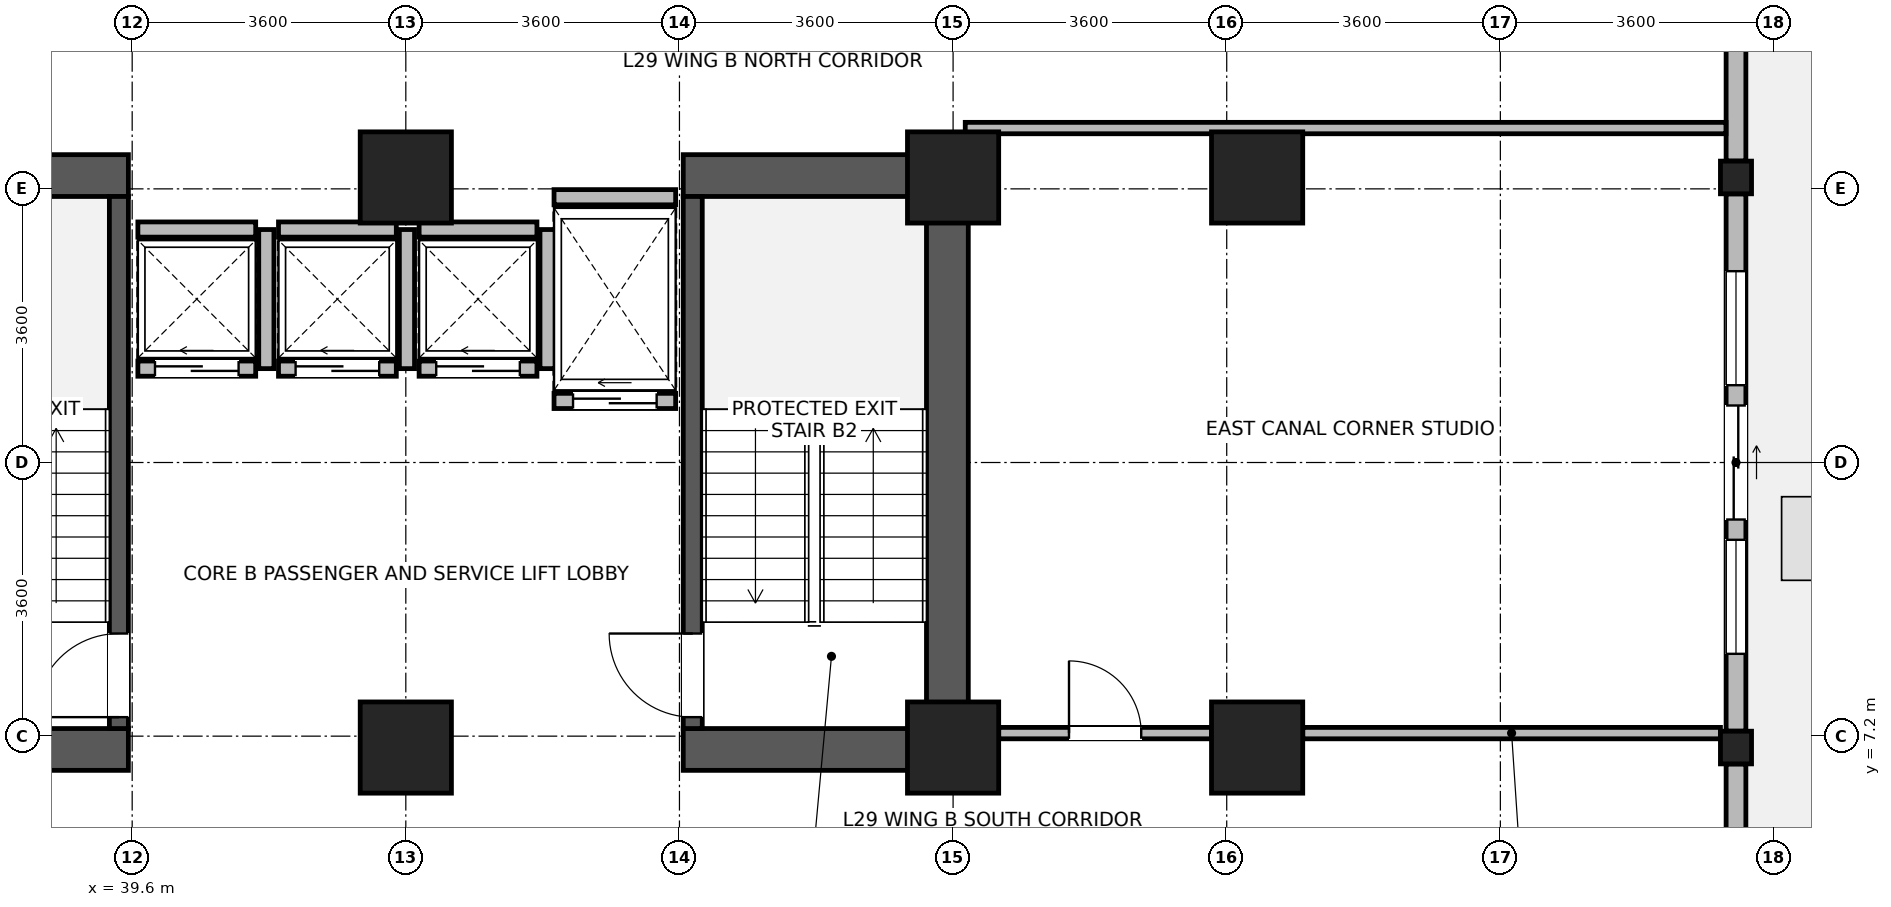
"""IFC4 building model, lengths in metres.
Left out: names, types, materials, properties, quantities, classifications, styles, units other than length and angle.
Written with IfcOpenShell. Run it as: python <this file> out.ifc"""

import sys

from ifc_helpers import new_model, si_unit, direction, frame, frame_2d, origin, origin_2d, place, context, subcontext, project, spatial, rectangle, i_section, extrude, source, transform, mapped, element, fill, save


model = new_model("IFC4")
c1 = context("Model", 3, precision=1e-05, world=origin(), true_north=direction((0.0, 1.0)))
c2 = subcontext(c1, "Body", "Model", "MODEL_VIEW")
j1 = project(units=[si_unit("LENGTHUNIT", "METRE"), si_unit("PLANEANGLEUNIT", "RADIAN")], contexts=[c1])
p1 = place(None, origin())
s1 = spatial("IfcSite", under=j1, at=p1, CompositionType="ELEMENT")
p2 = place(p1, origin())
s2 = spatial("IfcBuilding", under=s1, at=p2, CompositionType="ELEMENT")
p3 = place(p2, frame((0.0, 0.0, 115.6)))
s3 = spatial("IfcBuildingStorey", under=s2, at=p3, CompositionType="ELEMENT", Elevation=115.6)
p4 = place(p3, frame((50.325, 6.75, 0.0), z_axis=(0.0, 0.0, 1.0), x_axis=(0.0, 1.0, 0.0)))
e1 = element("IfcWall", 1, at=p4, inside=s3, PredefinedType="SHEAR", context=c2, shape_type="SweptSolid", body=[
    extrude(rectangle(XDim=8.1, YDim=0.55, at=frame_2d((4.05, 0.0))), origin(), (0.0, 0.0, 1.0), 3.45),
])
for number, where, z_axis, x_axis in (
    (2, (36.35, 7.025, 0.0), (0.0, 0.0, 1.0), (1.0, 0.0, 0.0)),
    (3, (46.85, 7.025, 0.0), (0.0, 0.0, 1.0), (1.0, 0.0, 0.0)),
    (4, (36.35, 14.575, 0.0), (0.0, 0.0, 1.0), (1.0, 0.0, 0.0)),
    (5, (46.85, 14.575, 0.0), (0.0, 0.0, 1.0), (1.0, 0.0, 0.0)),
):
    element("IfcWall", number, at=place(p3, frame(where, z_axis=z_axis, x_axis=x_axis)), inside=s3, PredefinedType="SHEAR", context=c2, shape_type="SweptSolid", body=[
        extrude(rectangle(XDim=3.2, YDim=0.55, at=frame_2d((1.6, 0.0))), origin(), (0.0, 0.0, 1.0), 3.45),
    ])
p5 = place(p3, frame((39.425, 7.3, 0.0), z_axis=(0.0, 0.0, 1.0), x_axis=(0.0, 1.0, 0.0)))
e6 = element("IfcWall", 6, at=p5, inside=s3, PredefinedType="SHEAR", context=c2, shape_type="SweptSolid", body=[
    extrude(rectangle(XDim=7.0, YDim=0.25, at=frame_2d((3.5, 0.0))), origin(), (0.0, 0.0, 1.0), 3.45),
])
p6 = place(p5, frame((0.15, 0.0, 0.0)))
e7 = element("IfcOpeningElement", 7, at=p6, cuts=e6, PredefinedType="OPENING", context=c2, shape_type="SweptSolid", body=[
    extrude(rectangle(XDim=1.1, YDim=2.08, at=frame_2d((0.55, 1.04))), frame((0.0, 0.135, 0.0), z_axis=(0.0, -1.0, 0.0), x_axis=(1.0, 0.0, 0.0)), (0.0, 0.0, 1.0), 0.27),
])
p7 = place(p3, frame((46.975, 7.3, 0.0), z_axis=(0.0, 0.0, 1.0), x_axis=(0.0, 1.0, 0.0)))
e8 = element("IfcWall", 8, at=p7, inside=s3, PredefinedType="SHEAR", context=c2, shape_type="SweptSolid", body=[
    extrude(rectangle(XDim=7.0, YDim=0.25, at=frame_2d((3.5, 0.0))), origin(), (0.0, 0.0, 1.0), 3.45),
])
p8 = place(p7, frame((0.15, 0.0, 0.0)))
e9 = element("IfcOpeningElement", 9, at=p8, cuts=e8, PredefinedType="OPENING", context=c2, shape_type="SweptSolid", body=[
    extrude(rectangle(XDim=1.1, YDim=2.08, at=frame_2d((0.55, 1.04))), frame((0.0, 0.135, 0.0), z_axis=(0.0, -1.0, 0.0), x_axis=(1.0, 0.0, 0.0)), (0.0, 0.0, 1.0), 0.27),
])
m1 = source(origin(), c2, "Body", "SweptSolid", [
    extrude(rectangle(XDim=1.2, YDim=1.2, at=origin_2d()), origin(), (0.0, 0.0, 1.0), 3.7),
])
for number, where, z_axis, x_axis in (
    (10, (43.2, 7.05, 0.0), (0.0, 0.0, 1.0), (1.0, 0.0, 0.0)),
    (11, (43.2, 14.55, 0.0), (0.0, 0.0, 1.0), (1.0, 0.0, 0.0)),
    (12, (50.4, 7.05, 0.0), (0.0, 0.0, 1.0), (1.0, 0.0, 0.0)),
    (13, (50.4, 14.55, 0.0), (0.0, 0.0, 1.0), (1.0, 0.0, 0.0)),
    (14, (54.4, 7.05, 0.0), (0.0, 0.0, 1.0), (1.0, 0.0, 0.0)),
    (15, (54.4, 14.55, 0.0), (0.0, 0.0, 1.0), (1.0, 0.0, 0.0)),
):
    element("IfcColumn", number, at=place(p3, frame(where, z_axis=z_axis, x_axis=x_axis)), inside=s3, PredefinedType="COLUMN", context=c2, shape_type="MappedRepresentation", body=[
        mapped(m1, transform((0.0, 0.0, 0.0), x_axis=(1.0, 0.0, 0.0), y_axis=(0.0, 1.0, 0.0), z_axis=(0.0, 0.0, 1.0), scale=1.0)),
    ])
m2 = source(origin(), c2, "Body", "SweptSolid", [
    extrude(i_section(OverallWidth=0.409, OverallDepth=0.43, WebThickness=0.024, FlangeThickness=0.033, FilletRadius=0.015, at=origin_2d()), origin(), (0.0, 0.0, 1.0), 3.7),
])
for number, where, z_axis, x_axis in (
    (16, (60.7, 7.05, 0.0), (0.0, 0.0, 1.0), (1.0, 0.0, 0.0)),
    (17, (60.7, 14.55, 0.0), (0.0, 0.0, 1.0), (1.0, 0.0, 0.0)),
):
    element("IfcColumn", number, at=place(p3, frame(where, z_axis=z_axis, x_axis=x_axis)), inside=s3, PredefinedType="COLUMN", context=c2, shape_type="MappedRepresentation", body=[
        mapped(m2, transform((0.0, 0.0, 0.0), x_axis=(1.0, 0.0, 0.0), y_axis=(0.0, 1.0, 0.0), z_axis=(0.0, 0.0, 1.0), scale=1.0)),
    ])
p9 = place(p3, frame((60.7, 6.834, 0.0), z_axis=(0.0, 0.0, 1.0), x_axis=(0.0, -1.0, 0.0)))
e18 = element("IfcWall", 18, at=p9, inside=s3, PredefinedType="STANDARD", context=c2, shape_type="SweptSolid", body=[
    extrude(rectangle(XDim=2.164, YDim=0.26, at=frame_2d((1.082, 0.0))), origin(), (0.0, 0.0, 1.0), 3.43),
])
p10 = place(p3, frame((60.7, 14.334, 0.0), z_axis=(0.0, 0.0, 1.0), x_axis=(0.0, -1.0, 0.0)))
e19 = element("IfcWall", 19, at=p10, inside=s3, PredefinedType="STANDARD", context=c2, shape_type="SweptSolid", body=[
    extrude(rectangle(XDim=7.068, YDim=0.26, at=frame_2d((3.534, 0.0))), origin(), (0.0, 0.0, 1.0), 2.98),
])
p11 = place(p10, frame((2.784, 0.0, 0.0)))
e20 = element("IfcOpeningElement", 20, at=p11, cuts=e19, PredefinedType="OPENING", context=c2, shape_type="SweptSolid", body=[
    extrude(rectangle(XDim=1.5, YDim=2.15, at=frame_2d((0.75, 1.075))), frame((0.0, 0.14, 0.0), z_axis=(0.0, -1.0, 0.0), x_axis=(1.0, 0.0, 0.0)), (0.0, 0.0, 1.0), 0.28),
])
p12 = place(p10, frame((1.017, 0.0, 0.85)))
e21 = element("IfcOpeningElement", 21, at=p12, cuts=e19, PredefinedType="OPENING", context=c2, shape_type="SweptSolid", body=[
    extrude(rectangle(XDim=1.5, YDim=1.85, at=frame_2d((0.75, 0.925))), frame((0.0, 0.14, 0.0), z_axis=(0.0, -1.0, 0.0), x_axis=(1.0, 0.0, 0.0)), (0.0, 0.0, 1.0), 0.28),
])
p13 = place(p10, frame((4.551, 0.0, 0.85)))
e22 = element("IfcOpeningElement", 22, at=p13, cuts=e19, PredefinedType="OPENING", context=c2, shape_type="SweptSolid", body=[
    extrude(rectangle(XDim=1.5, YDim=1.85, at=frame_2d((0.75, 0.925))), frame((0.0, 0.14, 0.0), z_axis=(0.0, -1.0, 0.0), x_axis=(1.0, 0.0, 0.0)), (0.0, 0.0, 1.0), 0.28),
])
p14 = place(p3, frame((60.7, 21.384, 0.0), z_axis=(0.0, 0.0, 1.0), x_axis=(0.0, -1.0, 0.0)))
e23 = element("IfcWall", 23, at=p14, inside=s3, PredefinedType="STANDARD", context=c2, shape_type="SweptSolid", body=[
    extrude(rectangle(XDim=6.618, YDim=0.26, at=frame_2d((3.309, 0.0))), origin(), (0.0, 0.0, 1.0), 2.98),
])
p15 = place(p14, frame((0.905, 0.0, 0.85)))
e24 = element("IfcOpeningElement", 24, at=p15, cuts=e23, PredefinedType="OPENING", context=c2, shape_type="SweptSolid", body=[
    extrude(rectangle(XDim=1.5, YDim=1.85, at=frame_2d((0.75, 0.925))), frame((0.0, 0.14, 0.0), z_axis=(0.0, -1.0, 0.0), x_axis=(1.0, 0.0, 0.0)), (0.0, 0.0, 1.0), 0.28),
])
p16 = place(p14, frame((2.834, 0.0, 0.85)))
e25 = element("IfcOpeningElement", 25, at=p16, cuts=e23, PredefinedType="OPENING", context=c2, shape_type="SweptSolid", body=[
    extrude(rectangle(XDim=0.95, YDim=1.75, at=frame_2d((0.475, 0.875))), frame((0.0, 0.14, 0.0), z_axis=(0.0, -1.0, 0.0), x_axis=(1.0, 0.0, 0.0)), (0.0, 0.0, 1.0), 0.28),
])
p17 = place(p3, frame((39.675, 12.035, 0.0), z_axis=(0.0, 0.0, 1.0), x_axis=(1.0, 0.0, 0.0)))
e26 = element("IfcWall", 26, at=p17, inside=s3, PredefinedType="PARTITIONING", context=c2, shape_type="SweptSolid", body=[
    extrude(rectangle(XDim=1.55, YDim=0.2, at=frame_2d((0.775, 0.0))), origin(), (0.0, 0.0, 1.0), 3.43),
])
p18 = place(p17, frame((0.225, 0.0, 0.0)))
e27 = element("IfcOpeningElement", 27, at=p18, cuts=e26, PredefinedType="OPENING", context=c2, shape_type="SweptSolid", body=[
    extrude(rectangle(XDim=1.1, YDim=2.12, at=frame_2d((0.55, 1.06))), frame((0.0, 0.11, 0.0), z_axis=(0.0, -1.0, 0.0), x_axis=(1.0, 0.0, 0.0)), (0.0, 0.0, 1.0), 0.22),
])
p19 = place(p3, frame((39.675, 13.865, 0.0), z_axis=(0.0, 0.0, 1.0), x_axis=(1.0, 0.0, 0.0)))
e28 = element("IfcWall", 28, at=p19, inside=s3, PredefinedType="PARTITIONING", context=c2, shape_type="SweptSolid", body=[
    extrude(rectangle(XDim=1.55, YDim=0.2, at=frame_2d((0.775, 0.0))), origin(), (0.0, 0.0, 1.0), 3.43),
])
p20 = place(p3, frame((41.365, 12.035, 0.0), z_axis=(0.0, 0.0, 1.0), x_axis=(0.0, 1.0, 0.0)))
e29 = element("IfcWall", 29, at=p20, inside=s3, PredefinedType="PARTITIONING", context=c2, shape_type="SweptSolid", body=[
    extrude(rectangle(XDim=1.83, YDim=0.2, at=frame_2d((0.915, 0.0))), origin(), (0.0, 0.0, 1.0), 3.43),
])
p21 = place(p3, frame((41.525, 12.035, 0.0), z_axis=(0.0, 0.0, 1.0), x_axis=(1.0, 0.0, 0.0)))
e30 = element("IfcWall", 30, at=p21, inside=s3, PredefinedType="PARTITIONING", context=c2, shape_type="SweptSolid", body=[
    extrude(rectangle(XDim=1.55, YDim=0.2, at=frame_2d((0.775, 0.0))), origin(), (0.0, 0.0, 1.0), 3.43),
])
p22 = place(p21, frame((0.225, 0.0, 0.0)))
e31 = element("IfcOpeningElement", 31, at=p22, cuts=e30, PredefinedType="OPENING", context=c2, shape_type="SweptSolid", body=[
    extrude(rectangle(XDim=1.1, YDim=2.12, at=frame_2d((0.55, 1.06))), frame((0.0, 0.11, 0.0), z_axis=(0.0, -1.0, 0.0), x_axis=(1.0, 0.0, 0.0)), (0.0, 0.0, 1.0), 0.22),
])
p23 = place(p3, frame((41.525, 13.865, 0.0), z_axis=(0.0, 0.0, 1.0), x_axis=(1.0, 0.0, 0.0)))
e32 = element("IfcWall", 32, at=p23, inside=s3, PredefinedType="PARTITIONING", context=c2, shape_type="SweptSolid", body=[
    extrude(rectangle(XDim=1.55, YDim=0.2, at=frame_2d((0.775, 0.0))), origin(), (0.0, 0.0, 1.0), 3.43),
])
p24 = place(p3, frame((43.215, 12.035, 0.0), z_axis=(0.0, 0.0, 1.0), x_axis=(0.0, 1.0, 0.0)))
e33 = element("IfcWall", 33, at=p24, inside=s3, PredefinedType="PARTITIONING", context=c2, shape_type="SweptSolid", body=[
    extrude(rectangle(XDim=1.83, YDim=0.2, at=frame_2d((0.915, 0.0))), origin(), (0.0, 0.0, 1.0), 3.43),
])
p25 = place(p3, frame((43.375, 12.035, 0.0), z_axis=(0.0, 0.0, 1.0), x_axis=(1.0, 0.0, 0.0)))
e34 = element("IfcWall", 34, at=p25, inside=s3, PredefinedType="PARTITIONING", context=c2, shape_type="SweptSolid", body=[
    extrude(rectangle(XDim=1.55, YDim=0.2, at=frame_2d((0.775, 0.0))), origin(), (0.0, 0.0, 1.0), 3.43),
])
p26 = place(p25, frame((0.225, 0.0, 0.0)))
e35 = element("IfcOpeningElement", 35, at=p26, cuts=e34, PredefinedType="OPENING", context=c2, shape_type="SweptSolid", body=[
    extrude(rectangle(XDim=1.1, YDim=2.12, at=frame_2d((0.55, 1.06))), frame((0.0, 0.11, 0.0), z_axis=(0.0, -1.0, 0.0), x_axis=(1.0, 0.0, 0.0)), (0.0, 0.0, 1.0), 0.22),
])
p27 = place(p3, frame((43.375, 13.865, 0.0), z_axis=(0.0, 0.0, 1.0), x_axis=(1.0, 0.0, 0.0)))
e36 = element("IfcWall", 36, at=p27, inside=s3, PredefinedType="PARTITIONING", context=c2, shape_type="SweptSolid", body=[
    extrude(rectangle(XDim=1.55, YDim=0.2, at=frame_2d((0.775, 0.0))), origin(), (0.0, 0.0, 1.0), 3.43),
])
p28 = place(p3, frame((45.065, 12.035, 0.0), z_axis=(0.0, 0.0, 1.0), x_axis=(0.0, 1.0, 0.0)))
e37 = element("IfcWall", 37, at=p28, inside=s3, PredefinedType="PARTITIONING", context=c2, shape_type="SweptSolid", body=[
    extrude(rectangle(XDim=1.83, YDim=0.2, at=frame_2d((0.915, 0.0))), origin(), (0.0, 0.0, 1.0), 3.43),
])
p29 = place(p3, frame((45.15, 11.61, 0.0), z_axis=(0.0, 0.0, 1.0), x_axis=(1.0, 0.0, 0.0)))
e38 = element("IfcWall", 38, at=p29, inside=s3, PredefinedType="PARTITIONING", context=c2, shape_type="SweptSolid", body=[
    extrude(rectangle(XDim=1.6, YDim=0.2, at=frame_2d((0.8, 0.0))), origin(), (0.0, 0.0, 1.0), 3.43),
])
p30 = place(p29, frame((0.25, 0.0, 0.0)))
e39 = element("IfcOpeningElement", 39, at=p30, cuts=e38, PredefinedType="OPENING", context=c2, shape_type="SweptSolid", body=[
    extrude(rectangle(XDim=1.1, YDim=2.12, at=frame_2d((0.55, 1.06))), frame((0.0, 0.11, 0.0), z_axis=(0.0, -1.0, 0.0), x_axis=(1.0, 0.0, 0.0)), (0.0, 0.0, 1.0), 0.22),
])
p31 = place(p3, frame((45.15, 14.29, 0.0), z_axis=(0.0, 0.0, 1.0), x_axis=(1.0, 0.0, 0.0)))
e40 = element("IfcWall", 40, at=p31, inside=s3, PredefinedType="PARTITIONING", context=c2, shape_type="SweptSolid", body=[
    extrude(rectangle(XDim=1.6, YDim=0.2, at=frame_2d((0.8, 0.0))), origin(), (0.0, 0.0, 1.0), 2.43),
])
p32 = place(p3, frame((51.0, 7.24, 0.0), z_axis=(0.0, 0.0, 1.0), x_axis=(1.0, 0.0, 0.0)))
e41 = element("IfcWall", 41, at=p32, inside=s3, PredefinedType="PARTITIONING", context=c2, shape_type="SweptSolid", body=[
    extrude(rectangle(XDim=2.8, YDim=0.15, at=frame_2d((1.4, 0.0))), origin(), (0.0, 0.0, 1.0), 2.78),
])
p33 = place(p32, frame((0.925, 0.0, 0.0)))
e42 = element("IfcOpeningElement", 42, at=p33, cuts=e41, PredefinedType="OPENING", context=c2, shape_type="SweptSolid", body=[
    extrude(rectangle(XDim=0.95, YDim=2.1, at=frame_2d((0.475, 1.05))), frame((0.0, 0.085, 0.0), z_axis=(0.0, -1.0, 0.0), x_axis=(1.0, 0.0, 0.0)), (0.0, 0.0, 1.0), 0.17),
])
p34 = place(p3, frame((55.0, 7.24, 0.0), z_axis=(0.0, 0.0, 1.0), x_axis=(1.0, 0.0, 0.0)))
e43 = element("IfcWall", 43, at=p34, inside=s3, PredefinedType="PARTITIONING", context=c2, shape_type="SweptSolid", body=[
    extrude(rectangle(XDim=5.496, YDim=0.15, at=frame_2d((2.748, 0.0))), origin(), (0.0, 0.0, 1.0), 2.78),
])
p35 = place(p3, frame((50.56, 15.2, 0.0), z_axis=(0.0, 0.0, 1.0), x_axis=(1.0, 0.0, 0.0)))
e44 = element("IfcWall", 44, at=p35, inside=s3, PredefinedType="PARTITIONING", context=c2, shape_type="SweptSolid", body=[
    extrude(rectangle(XDim=10.008, YDim=0.15, at=frame_2d((5.004, 0.0))), origin(), (0.0, 0.0, 1.0), 3.43),
])
p36 = place(p11, origin())
e45 = element("IfcDoor", 45, at=p36, inside=s3, OperationType="SLIDING_TO_LEFT", PredefinedType="DOOR", context=c2, shape_type="SweptSolid", body=[
    extrude(rectangle(XDim=1.5, YDim=2.15, at=frame_2d((0.75, 1.075))), frame((0.0, 0.025, 0.0), z_axis=(0.0, -1.0, 0.0), x_axis=(1.0, 0.0, 0.0)), (0.0, 0.0, 1.0), 0.05),
])
fill(e20, e45)
p37 = place(p12, origin())
e46 = element("IfcWindow", 46, at=p37, inside=s3, PartitioningType="SINGLE_PANEL", PredefinedType="WINDOW", context=c2, shape_type="SweptSolid", body=[
    extrude(rectangle(XDim=1.5, YDim=1.85, at=frame_2d((0.75, 0.925))), frame((0.0, 0.03, 0.0), z_axis=(0.0, -1.0, 0.0), x_axis=(1.0, 0.0, 0.0)), (0.0, 0.0, 1.0), 0.06),
])
fill(e21, e46)
p38 = place(p13, origin())
e47 = element("IfcWindow", 47, at=p38, inside=s3, PartitioningType="SINGLE_PANEL", PredefinedType="WINDOW", context=c2, shape_type="SweptSolid", body=[
    extrude(rectangle(XDim=1.5, YDim=1.85, at=frame_2d((0.75, 0.925))), frame((0.0, 0.03, 0.0), z_axis=(0.0, -1.0, 0.0), x_axis=(1.0, 0.0, 0.0)), (0.0, 0.0, 1.0), 0.06),
])
fill(e22, e47)
p39 = place(p6, origin())
e48 = element("IfcDoor", 48, at=p39, inside=s3, OperationType="SINGLE_SWING_LEFT", PredefinedType="DOOR", context=c2, shape_type="SweptSolid", body=[
    extrude(rectangle(XDim=1.1, YDim=2.08, at=frame_2d((0.55, 1.04))), frame((0.0, 0.025, 0.0), z_axis=(0.0, -1.0, 0.0), x_axis=(1.0, 0.0, 0.0)), (0.0, 0.0, 1.0), 0.05),
])
fill(e7, e48)
p40 = place(p8, origin())
e49 = element("IfcDoor", 49, at=p40, inside=s3, OperationType="SINGLE_SWING_RIGHT", PredefinedType="DOOR", context=c2, shape_type="SweptSolid", body=[
    extrude(rectangle(XDim=1.1, YDim=2.08, at=frame_2d((0.55, 1.04))), frame((0.0, 0.025, 0.0), z_axis=(0.0, -1.0, 0.0), x_axis=(1.0, 0.0, 0.0)), (0.0, 0.0, 1.0), 0.05),
])
fill(e9, e49)
p41 = place(p18, origin())
e50 = element("IfcDoor", 50, at=p41, inside=s3, OperationType="SLIDING_TO_LEFT", PredefinedType="DOOR", context=c2, shape_type="SweptSolid", body=[
    extrude(rectangle(XDim=1.1, YDim=2.12, at=frame_2d((0.55, 1.06))), frame((0.0, 0.025, 0.0), z_axis=(0.0, -1.0, 0.0), x_axis=(1.0, 0.0, 0.0)), (0.0, 0.0, 1.0), 0.05),
])
fill(e27, e50)
p42 = place(p22, origin())
e51 = element("IfcDoor", 51, at=p42, inside=s3, OperationType="SLIDING_TO_LEFT", PredefinedType="DOOR", context=c2, shape_type="SweptSolid", body=[
    extrude(rectangle(XDim=1.1, YDim=2.12, at=frame_2d((0.55, 1.06))), frame((0.0, 0.025, 0.0), z_axis=(0.0, -1.0, 0.0), x_axis=(1.0, 0.0, 0.0)), (0.0, 0.0, 1.0), 0.05),
])
fill(e31, e51)
p43 = place(p26, origin())
e52 = element("IfcDoor", 52, at=p43, inside=s3, OperationType="SLIDING_TO_LEFT", PredefinedType="DOOR", context=c2, shape_type="SweptSolid", body=[
    extrude(rectangle(XDim=1.1, YDim=2.12, at=frame_2d((0.55, 1.06))), frame((0.0, 0.025, 0.0), z_axis=(0.0, -1.0, 0.0), x_axis=(1.0, 0.0, 0.0)), (0.0, 0.0, 1.0), 0.05),
])
fill(e35, e52)
p44 = place(p30, origin())
e53 = element("IfcDoor", 53, at=p44, inside=s3, OperationType="SLIDING_TO_LEFT", PredefinedType="DOOR", context=c2, shape_type="SweptSolid", body=[
    extrude(rectangle(XDim=1.1, YDim=2.12, at=frame_2d((0.55, 1.06))), frame((0.0, 0.025, 0.0), z_axis=(0.0, -1.0, 0.0), x_axis=(1.0, 0.0, 0.0)), (0.0, 0.0, 1.0), 0.05),
])
fill(e39, e53)
p45 = place(p33, origin())
e54 = element("IfcDoor", 54, at=p45, inside=s3, OperationType="SINGLE_SWING_LEFT", PredefinedType="DOOR", context=c2, shape_type="SweptSolid", body=[
    extrude(rectangle(XDim=0.95, YDim=2.1, at=frame_2d((0.475, 1.05))), frame((0.0, 0.025, 0.0), z_axis=(0.0, -1.0, 0.0), x_axis=(1.0, 0.0, 0.0)), (0.0, 0.0, 1.0), 0.05),
])
fill(e42, e54)
save(model, sys.argv[1])
